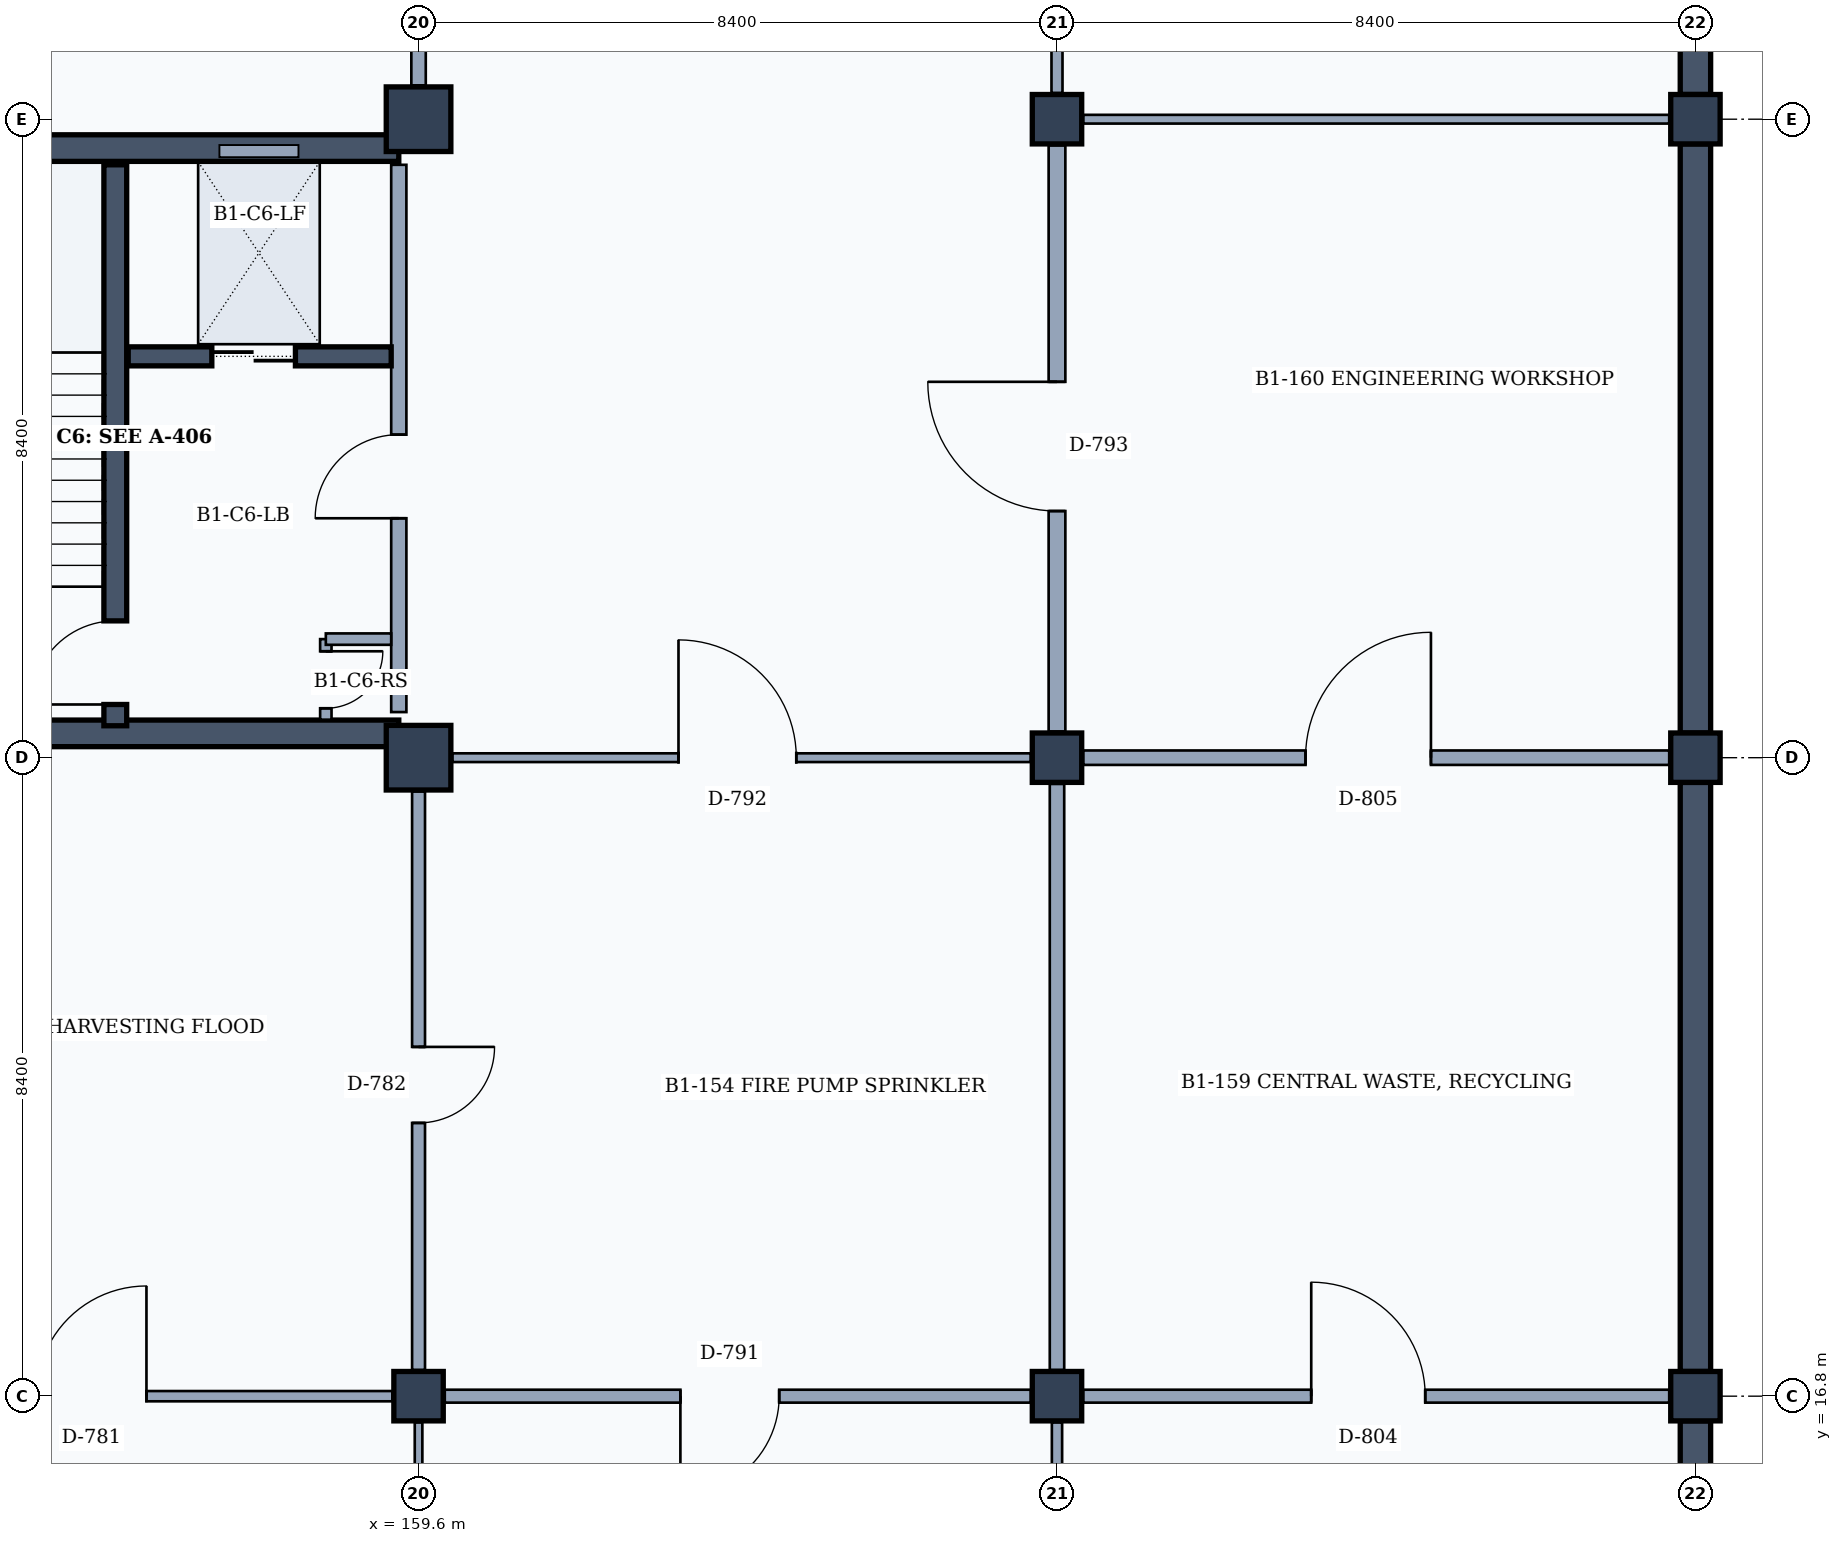
"""IFC4 building model, lengths in metres.
Left out: names, types, materials, properties, quantities, classifications, styles, units other than length and angle.
Written with IfcOpenShell. Run it as: python <this file> out.ifc"""

import sys

from ifc_helpers import new_model, si_unit, direction, frame, frame_2d, origin, origin_2d, place, context, subcontext, project, spatial, rectangle, extrude, element, fill, save


model = new_model("IFC4")
c1 = context("Model", 3, precision=1e-05, world=origin(), true_north=direction((0.0, 1.0)))
c2 = subcontext(c1, "Body", "Model", "MODEL_VIEW")
j1 = project(units=[si_unit("LENGTHUNIT", "METRE"), si_unit("PLANEANGLEUNIT", "RADIAN")], contexts=[c1])
p1 = place(None, origin())
s1 = spatial("IfcSite", under=j1, at=p1, CompositionType="ELEMENT")
p2 = place(p1, origin())
s2 = spatial("IfcBuilding", under=s1, at=p2, CompositionType="ELEMENT")
p3 = place(p2, frame((0.0, 0.0, -4.2)))
s3 = spatial("IfcBuildingStorey", under=s2, at=p3, CompositionType="ELEMENT", Elevation=-4.2)
p4 = place(p3, frame((159.6, 16.8, 0.0), z_axis=(0.0, 0.0, 1.0), x_axis=(1.0, 0.0, 0.0)))
e1 = element("IfcColumn", 1, at=p4, inside=s3, PredefinedType="COLUMN", context=c2, shape_type="SweptSolid", body=[
    extrude(rectangle(XDim=0.65, YDim=0.65, at=origin_2d()), origin(), (0.0, 0.0, 1.0), 4.2),
])
for number, where, z_axis, x_axis in (
    (2, (159.6, 25.2, 0.0), (0.0, 0.0, 1.0), (1.0, 0.0, 0.0)),
    (3, (159.6, 33.6, 0.0), (0.0, 0.0, 1.0), (1.0, 0.0, 0.0)),
):
    element("IfcColumn", number, at=place(p3, frame(where, z_axis=z_axis, x_axis=x_axis)), inside=s3, PredefinedType="COLUMN", context=c2, shape_type="SweptSolid", body=[
        extrude(rectangle(XDim=0.85, YDim=0.85, at=origin_2d()), origin(), (0.0, 0.0, 1.0), 4.2),
    ])
for number, where, z_axis, x_axis in (
    (4, (168.0, 16.8, 0.0), (0.0, 0.0, 1.0), (1.0, 0.0, 0.0)),
    (5, (168.0, 25.2, 0.0), (0.0, 0.0, 1.0), (1.0, 0.0, 0.0)),
    (6, (168.0, 33.6, 0.0), (0.0, 0.0, 1.0), (1.0, 0.0, 0.0)),
    (7, (176.4, 16.8, 0.0), (0.0, 0.0, 1.0), (1.0, 0.0, 0.0)),
    (8, (176.4, 25.2, 0.0), (0.0, 0.0, 1.0), (1.0, 0.0, 0.0)),
    (9, (176.4, 33.6, 0.0), (0.0, 0.0, 1.0), (1.0, 0.0, 0.0)),
):
    element("IfcColumn", number, at=place(p3, frame(where, z_axis=z_axis, x_axis=x_axis)), inside=s3, PredefinedType="COLUMN", context=c2, shape_type="SweptSolid", body=[
        extrude(rectangle(XDim=0.65, YDim=0.65, at=origin_2d()), origin(), (0.0, 0.0, 1.0), 4.2),
    ])
for number, where, z_axis, x_axis in (
    (10, (176.4, 16.475, 0.0), (0.0, 0.0, 1.0), (0.0, -1.0, 0.0)),
    (11, (176.4, 24.875, 0.0), (0.0, 0.0, 1.0), (0.0, -1.0, 0.0)),
    (12, (176.4, 33.275, 0.0), (0.0, 0.0, 1.0), (0.0, -1.0, 0.0)),
    (13, (176.4, 41.675, 0.0), (0.0, 0.0, 1.0), (0.0, -1.0, 0.0)),
):
    element("IfcWall", number, at=place(p3, frame(where, z_axis=z_axis, x_axis=x_axis)), inside=s3, PredefinedType="STANDARD", context=c2, shape_type="SweptSolid", body=[
        extrude(rectangle(XDim=7.75, YDim=0.4, at=frame_2d((3.875, 0.0))), origin(), (0.0, 0.0, 1.0), 3.88),
    ])
p5 = place(p3, frame((151.44, 33.22, 0.0), z_axis=(0.0, 0.0, 1.0), x_axis=(1.0, 0.0, 0.0)))
e14 = element("IfcWall", 14, at=p5, inside=s3, PredefinedType="SHEAR", context=c2, shape_type="SweptSolid", body=[
    extrude(rectangle(XDim=7.9, YDim=0.35, at=frame_2d((3.95, 0.0))), origin(), (0.0, 0.0, 1.0), 3.9),
])
p6 = place(p3, frame((159.34, 33.0, 0.0), z_axis=(0.0, 0.0, 1.0), x_axis=(0.0, -1.0, 0.0)))
e15 = element("IfcWall", 15, at=p6, inside=s3, PredefinedType="PARTITIONING", context=c2, shape_type="SweptSolid", body=[
    extrude(rectangle(XDim=7.2, YDim=0.2, at=frame_2d((3.6, 0.0))), origin(), (0.0, 0.0, 1.0), 3.1),
])
p7 = place(p6, frame((3.55, 0.0, 0.0)))
e16 = element("IfcOpeningElement", 16, at=p7, cuts=e15, PredefinedType="OPENING", context=c2, shape_type="SweptSolid", body=[
    extrude(rectangle(XDim=1.1, YDim=2.15, at=frame_2d((0.55, 1.075))), frame((0.0, 0.11, 0.0), z_axis=(0.0, -1.0, 0.0), x_axis=(1.0, 0.0, 0.0)), (0.0, 0.0, 1.0), 0.22),
])
p8 = place(p3, frame((159.34, 25.52, 0.0), z_axis=(0.0, 0.0, 1.0), x_axis=(-1.0, 0.0, 0.0)))
e17 = element("IfcWall", 17, at=p8, inside=s3, PredefinedType="SHEAR", context=c2, shape_type="SweptSolid", body=[
    extrude(rectangle(XDim=7.9, YDim=0.35, at=frame_2d((3.95, 0.0))), origin(), (0.0, 0.0, 1.0), 3.9),
])
p9 = place(p3, frame((155.61, 25.62, 0.0), z_axis=(0.0, 0.0, 1.0), x_axis=(0.0, 1.0, 0.0)))
e18 = element("IfcWall", 18, at=p9, inside=s3, PredefinedType="SHEAR", context=c2, shape_type="SweptSolid", body=[
    extrude(rectangle(XDim=7.38, YDim=0.3, at=frame_2d((3.69, 0.0))), origin(), (0.0, 0.0, 1.0), 3.9),
])
p10 = place(p9, frame((0.28, 0.0, 0.0)))
e19 = element("IfcOpeningElement", 19, at=p10, cuts=e18, PredefinedType="OPENING", context=c2, shape_type="SweptSolid", body=[
    extrude(rectangle(XDim=1.1, YDim=2.15, at=frame_2d((0.55, 1.075))), frame((0.0, 0.16, 0.0), z_axis=(0.0, -1.0, 0.0), x_axis=(1.0, 0.0, 0.0)), (0.0, 0.0, 1.0), 0.32),
])
p11 = place(p3, frame((158.38, 26.76, 0.0), z_axis=(0.0, 0.0, 1.0), x_axis=(0.0, -1.0, 0.0)))
e20 = element("IfcWall", 20, at=p11, inside=s3, PredefinedType="PARTITIONING", context=c2, shape_type="SweptSolid", body=[
    extrude(rectangle(XDim=1.06, YDim=0.15, at=frame_2d((0.53, 0.0))), origin(), (0.0, 0.0, 1.0), 3.32),
])
p12 = place(p11, frame((0.16, 0.0, 0.0)))
e21 = element("IfcOpeningElement", 21, at=p12, cuts=e20, PredefinedType="OPENING", context=c2, shape_type="SweptSolid", body=[
    extrude(rectangle(XDim=0.75, YDim=2.05, at=frame_2d((0.375, 1.025))), frame((0.0, 0.085, 0.0), z_axis=(0.0, -1.0, 0.0), x_axis=(1.0, 0.0, 0.0)), (0.0, 0.0, 1.0), 0.17),
])
p13 = place(p3, frame((158.38, 26.76, 0.0), z_axis=(0.0, 0.0, 1.0), x_axis=(1.0, 0.0, 0.0)))
e22 = element("IfcWall", 22, at=p13, inside=s3, PredefinedType="PARTITIONING", context=c2, shape_type="SweptSolid", body=[
    extrude(rectangle(XDim=0.86, YDim=0.15, at=frame_2d((0.43, 0.0))), origin(), (0.0, 0.0, 1.0), 3.32),
])
p14 = place(p3, frame((155.78, 30.48, 0.0), z_axis=(0.0, 0.0, 1.0), x_axis=(1.0, 0.0, 0.0)))
e23 = element("IfcWall", 23, at=p14, inside=s3, PredefinedType="SHEAR", context=c2, shape_type="SweptSolid", body=[
    extrude(rectangle(XDim=3.46, YDim=0.25, at=frame_2d((1.73, 0.0))), origin(), (0.0, 0.0, 1.0), 3.9),
])
p15 = place(p14, frame((1.1, 0.0, 0.0)))
e24 = element("IfcOpeningElement", 24, at=p15, cuts=e23, PredefinedType="OPENING", context=c2, shape_type="SweptSolid", body=[
    extrude(rectangle(XDim=1.1, YDim=2.15, at=frame_2d((0.55, 1.075))), frame((0.0, 0.135, 0.0), z_axis=(0.0, -1.0, 0.0), x_axis=(1.0, 0.0, 0.0)), (0.0, 0.0, 1.0), 0.27),
])
p16 = place(p3, frame((159.6, 8.745, 0.0), z_axis=(0.0, 0.0, 1.0), x_axis=(0.0, 1.0, 0.0)))
e25 = element("IfcWall", 25, at=p16, inside=s3, PredefinedType="MOVABLE", context=c2, shape_type="SweptSolid", body=[
    extrude(rectangle(XDim=7.71, YDim=0.1, at=frame_2d((3.855, 0.0))), origin(), (0.0, 0.0, 1.0), 3.1),
])
p17 = place(p3, frame((151.545, 16.8, 0.0), z_axis=(0.0, 0.0, 1.0), x_axis=(1.0, 0.0, 0.0)))
e26 = element("IfcWall", 26, at=p17, inside=s3, PredefinedType="PARTITIONING", context=c2, shape_type="SweptSolid", body=[
    extrude(rectangle(XDim=7.71, YDim=0.135, at=frame_2d((3.855, 0.0))), origin(), (0.0, 0.0, 1.0), 3.05),
])
p18 = place(p17, frame((3.025, 0.0, 0.0)))
e27 = element("IfcOpeningElement", 27, at=p18, cuts=e26, PredefinedType="OPENING", context=c2, shape_type="SweptSolid", body=[
    extrude(rectangle(XDim=1.45, YDim=2.35, at=frame_2d((0.725, 1.175))), frame((0.0, 0.077, 0.0), z_axis=(0.0, -1.0, 0.0), x_axis=(1.0, 0.0, 0.0)), (0.0, 0.0, 1.0), 0.155),
])
p19 = place(p3, frame((159.6, 17.145, 0.0), z_axis=(0.0, 0.0, 1.0), x_axis=(0.0, 1.0, 0.0)))
e28 = element("IfcWall", 28, at=p19, inside=s3, PredefinedType="PARTITIONING", context=c2, shape_type="SweptSolid", body=[
    extrude(rectangle(XDim=7.61, YDim=0.17, at=frame_2d((3.805, 0.0))), origin(), (0.0, 0.0, 1.0), 3.1),
])
p20 = place(p19, frame((3.25, 0.0, 0.0)))
e29 = element("IfcOpeningElement", 29, at=p20, cuts=e28, PredefinedType="OPENING", context=c2, shape_type="SweptSolid", body=[
    extrude(rectangle(XDim=1.0, YDim=2.15, at=frame_2d((0.5, 1.075))), frame((0.0, 0.095, 0.0), z_axis=(0.0, -1.0, 0.0), x_axis=(1.0, 0.0, 0.0)), (0.0, 0.0, 1.0), 0.19),
])
p21 = place(p3, frame((159.6, 34.045, 0.0), z_axis=(0.0, 0.0, 1.0), x_axis=(0.0, 1.0, 0.0)))
e30 = element("IfcWall", 30, at=p21, inside=s3, PredefinedType="PARTITIONING", context=c2, shape_type="SweptSolid", body=[
    extrude(rectangle(XDim=7.61, YDim=0.19, at=frame_2d((3.805, 0.0))), origin(), (0.0, 0.0, 1.0), 3.1),
])
p22 = place(p3, frame((168.0, 8.745, 0.0), z_axis=(0.0, 0.0, 1.0), x_axis=(0.0, 1.0, 0.0)))
e31 = element("IfcWall", 31, at=p22, inside=s3, PredefinedType="PARTITIONING", context=c2, shape_type="SweptSolid", body=[
    extrude(rectangle(XDim=7.71, YDim=0.135, at=frame_2d((3.855, 0.0))), origin(), (0.0, 0.0, 1.0), 3.1),
])
p23 = place(p3, frame((159.945, 16.8, 0.0), z_axis=(0.0, 0.0, 1.0), x_axis=(1.0, 0.0, 0.0)))
e32 = element("IfcWall", 32, at=p23, inside=s3, PredefinedType="PARTITIONING", context=c2, shape_type="SweptSolid", body=[
    extrude(rectangle(XDim=7.71, YDim=0.17, at=frame_2d((3.855, 0.0))), origin(), (0.0, 0.0, 1.0), 3.05),
])
p24 = place(p23, frame((3.1, 0.0, 0.0)))
e33 = element("IfcOpeningElement", 33, at=p24, cuts=e32, PredefinedType="OPENING", context=c2, shape_type="SweptSolid", body=[
    extrude(rectangle(XDim=1.3, YDim=2.2, at=frame_2d((0.65, 1.1))), frame((0.0, 0.095, 0.0), z_axis=(0.0, -1.0, 0.0), x_axis=(1.0, 0.0, 0.0)), (0.0, 0.0, 1.0), 0.19),
])
p25 = place(p3, frame((168.0, 17.145, 0.0), z_axis=(0.0, 0.0, 1.0), x_axis=(0.0, 1.0, 0.0)))
e34 = element("IfcWall", 34, at=p25, inside=s3, PredefinedType="PARTITIONING", context=c2, shape_type="SweptSolid", body=[
    extrude(rectangle(XDim=7.71, YDim=0.19, at=frame_2d((3.855, 0.0))), origin(), (0.0, 0.0, 1.0), 3.1),
])
p26 = place(p3, frame((160.045, 25.2, 0.0), z_axis=(0.0, 0.0, 1.0), x_axis=(1.0, 0.0, 0.0)))
e35 = element("IfcWall", 35, at=p26, inside=s3, PredefinedType="PARTITIONING", context=c2, shape_type="SweptSolid", body=[
    extrude(rectangle(XDim=7.61, YDim=0.115, at=frame_2d((3.805, 0.0))), origin(), (0.0, 0.0, 1.0), 3.05),
])
p27 = place(p26, frame((2.975, 0.0, 0.0)))
e36 = element("IfcOpeningElement", 36, at=p27, cuts=e35, PredefinedType="OPENING", context=c2, shape_type="SweptSolid", body=[
    extrude(rectangle(XDim=1.55, YDim=2.35, at=frame_2d((0.775, 1.175))), frame((0.0, 0.067, 0.0), z_axis=(0.0, -1.0, 0.0), x_axis=(1.0, 0.0, 0.0)), (0.0, 0.0, 1.0), 0.135),
])
p28 = place(p3, frame((168.0, 25.545, 0.0), z_axis=(0.0, 0.0, 1.0), x_axis=(0.0, 1.0, 0.0)))
e37 = element("IfcWall", 37, at=p28, inside=s3, PredefinedType="PARTITIONING", context=c2, shape_type="SweptSolid", body=[
    extrude(rectangle(XDim=7.71, YDim=0.22, at=frame_2d((3.855, 0.0))), origin(), (0.0, 0.0, 1.0), 3.1),
])
p29 = place(p28, frame((2.9, 0.0, 0.0)))
e38 = element("IfcOpeningElement", 38, at=p29, cuts=e37, PredefinedType="OPENING", context=c2, shape_type="SweptSolid", body=[
    extrude(rectangle(XDim=1.7, YDim=2.3, at=frame_2d((0.85, 1.15))), frame((0.0, 0.12, 0.0), z_axis=(0.0, -1.0, 0.0), x_axis=(1.0, 0.0, 0.0)), (0.0, 0.0, 1.0), 0.24),
])
p30 = place(p3, frame((168.0, 33.945, 0.0), z_axis=(0.0, 0.0, 1.0), x_axis=(0.0, 1.0, 0.0)))
e39 = element("IfcWall", 39, at=p30, inside=s3, PredefinedType="PARTITIONING", context=c2, shape_type="SweptSolid", body=[
    extrude(rectangle(XDim=7.71, YDim=0.145, at=frame_2d((3.855, 0.0))), origin(), (0.0, 0.0, 1.0), 3.1),
])
p31 = place(p30, frame((2.8, 0.0, 0.0)))
e40 = element("IfcOpeningElement", 40, at=p31, cuts=e39, PredefinedType="OPENING", context=c2, shape_type="SweptSolid", body=[
    extrude(rectangle(XDim=1.9, YDim=2.4, at=frame_2d((0.95, 1.2))), frame((0.0, 0.083, 0.0), z_axis=(0.0, -1.0, 0.0), x_axis=(1.0, 0.0, 0.0)), (0.0, 0.0, 1.0), 0.165),
])
p32 = place(p3, frame((168.345, 16.8, 0.0), z_axis=(0.0, 0.0, 1.0), x_axis=(1.0, 0.0, 0.0)))
e41 = element("IfcWall", 41, at=p32, inside=s3, PredefinedType="PARTITIONING", context=c2, shape_type="SweptSolid", body=[
    extrude(rectangle(XDim=7.71, YDim=0.17, at=frame_2d((3.855, 0.0))), origin(), (0.0, 0.0, 1.0), 3.05),
])
p33 = place(p32, frame((3.0, 0.0, 0.0)))
e42 = element("IfcOpeningElement", 42, at=p33, cuts=e41, PredefinedType="OPENING", context=c2, shape_type="SweptSolid", body=[
    extrude(rectangle(XDim=1.5, YDim=2.3, at=frame_2d((0.75, 1.15))), frame((0.0, 0.095, 0.0), z_axis=(0.0, -1.0, 0.0), x_axis=(1.0, 0.0, 0.0)), (0.0, 0.0, 1.0), 0.19),
])
p34 = place(p3, frame((168.345, 25.2, 0.0), z_axis=(0.0, 0.0, 1.0), x_axis=(1.0, 0.0, 0.0)))
e43 = element("IfcWall", 43, at=p34, inside=s3, PredefinedType="PARTITIONING", context=c2, shape_type="SweptSolid", body=[
    extrude(rectangle(XDim=7.71, YDim=0.19, at=frame_2d((3.855, 0.0))), origin(), (0.0, 0.0, 1.0), 3.05),
])
p35 = place(p34, frame((2.925, 0.0, 0.0)))
e44 = element("IfcOpeningElement", 44, at=p35, cuts=e43, PredefinedType="OPENING", context=c2, shape_type="SweptSolid", body=[
    extrude(rectangle(XDim=1.65, YDim=2.25, at=frame_2d((0.825, 1.125))), frame((0.0, 0.105, 0.0), z_axis=(0.0, -1.0, 0.0), x_axis=(1.0, 0.0, 0.0)), (0.0, 0.0, 1.0), 0.21),
])
p36 = place(p3, frame((168.345, 33.6, 0.0), z_axis=(0.0, 0.0, 1.0), x_axis=(1.0, 0.0, 0.0)))
e45 = element("IfcWall", 45, at=p36, inside=s3, PredefinedType="PARTITIONING", context=c2, shape_type="SweptSolid", body=[
    extrude(rectangle(XDim=7.71, YDim=0.115, at=frame_2d((3.855, 0.0))), origin(), (0.0, 0.0, 1.0), 3.05),
])
p37 = place(p7, frame((1.1, 0.0, 0.0), z_axis=(0.0, 0.0, 1.0), x_axis=(-1.0, 0.0, 0.0)))
e46 = element("IfcDoor", 46, at=p37, inside=s3, OperationType="SINGLE_SWING_LEFT", PredefinedType="DOOR", context=c2, shape_type="SweptSolid", body=[
    extrude(rectangle(XDim=1.1, YDim=2.15, at=frame_2d((0.55, 1.075))), frame((0.0, 0.025, 0.0), z_axis=(0.0, -1.0, 0.0), x_axis=(1.0, 0.0, 0.0)), (0.0, 0.0, 1.0), 0.05),
])
fill(e16, e46)
p38 = place(p10, origin())
e47 = element("IfcDoor", 47, at=p38, inside=s3, OperationType="SINGLE_SWING_LEFT", PredefinedType="DOOR", context=c2, shape_type="SweptSolid", body=[
    extrude(rectangle(XDim=1.1, YDim=2.15, at=frame_2d((0.55, 1.075))), frame((0.0, 0.025, 0.0), z_axis=(0.0, -1.0, 0.0), x_axis=(1.0, 0.0, 0.0)), (0.0, 0.0, 1.0), 0.05),
])
fill(e19, e47)
p39 = place(p12, origin())
e48 = element("IfcDoor", 48, at=p39, inside=s3, OperationType="SINGLE_SWING_LEFT", PredefinedType="TRAPDOOR", context=c2, shape_type="SweptSolid", body=[
    extrude(rectangle(XDim=0.75, YDim=2.05, at=frame_2d((0.375, 1.025))), frame((0.0, 0.025, 0.0), z_axis=(0.0, -1.0, 0.0), x_axis=(1.0, 0.0, 0.0)), (0.0, 0.0, 1.0), 0.05),
])
fill(e21, e48)
p40 = place(p15, origin())
e49 = element("IfcDoor", 49, at=p40, inside=s3, OperationType="DOUBLE_DOOR_SLIDING", PredefinedType="DOOR", context=c2, shape_type="SweptSolid", body=[
    extrude(rectangle(XDim=1.1, YDim=2.15, at=frame_2d((0.55, 1.075))), frame((0.0, 0.025, 0.0), z_axis=(0.0, -1.0, 0.0), x_axis=(1.0, 0.0, 0.0)), (0.0, 0.0, 1.0), 0.05),
])
fill(e24, e49)
p41 = place(p18, origin())
e50 = element("IfcDoor", 50, at=p41, inside=s3, OperationType="SINGLE_SWING_RIGHT", PredefinedType="DOOR", context=c2, shape_type="SweptSolid", body=[
    extrude(rectangle(XDim=1.45, YDim=2.35, at=frame_2d((0.725, 1.175))), frame((0.0, 0.025, 0.0), z_axis=(0.0, -1.0, 0.0), x_axis=(1.0, 0.0, 0.0)), (0.0, 0.0, 1.0), 0.05),
])
fill(e27, e50)
p42 = place(p20, frame((1.0, 0.0, 0.0), z_axis=(0.0, 0.0, 1.0), x_axis=(-1.0, 0.0, 0.0)))
e51 = element("IfcDoor", 51, at=p42, inside=s3, OperationType="SINGLE_SWING_LEFT", PredefinedType="DOOR", context=c2, shape_type="SweptSolid", body=[
    extrude(rectangle(XDim=1.0, YDim=2.15, at=frame_2d((0.5, 1.075))), frame((0.0, 0.025, 0.0), z_axis=(0.0, -1.0, 0.0), x_axis=(1.0, 0.0, 0.0)), (0.0, 0.0, 1.0), 0.05),
])
fill(e29, e51)
p43 = place(p24, frame((1.3, 0.0, 0.0), z_axis=(0.0, 0.0, 1.0), x_axis=(-1.0, 0.0, 0.0)))
e52 = element("IfcDoor", 52, at=p43, inside=s3, OperationType="SINGLE_SWING_RIGHT", PredefinedType="DOOR", context=c2, shape_type="SweptSolid", body=[
    extrude(rectangle(XDim=1.3, YDim=2.2, at=frame_2d((0.65, 1.1))), frame((0.0, 0.025, 0.0), z_axis=(0.0, -1.0, 0.0), x_axis=(1.0, 0.0, 0.0)), (0.0, 0.0, 1.0), 0.05),
])
fill(e33, e52)
p44 = place(p27, origin())
e53 = element("IfcDoor", 53, at=p44, inside=s3, OperationType="SINGLE_SWING_LEFT", PredefinedType="DOOR", context=c2, shape_type="SweptSolid", body=[
    extrude(rectangle(XDim=1.55, YDim=2.35, at=frame_2d((0.775, 1.175))), frame((0.0, 0.025, 0.0), z_axis=(0.0, -1.0, 0.0), x_axis=(1.0, 0.0, 0.0)), (0.0, 0.0, 1.0), 0.05),
])
fill(e36, e53)
p45 = place(p29, origin())
e54 = element("IfcDoor", 54, at=p45, inside=s3, OperationType="SINGLE_SWING_RIGHT", PredefinedType="DOOR", context=c2, shape_type="SweptSolid", body=[
    extrude(rectangle(XDim=1.7, YDim=2.3, at=frame_2d((0.85, 1.15))), frame((0.0, 0.025, 0.0), z_axis=(0.0, -1.0, 0.0), x_axis=(1.0, 0.0, 0.0)), (0.0, 0.0, 1.0), 0.05),
])
fill(e38, e54)
p46 = place(p33, origin())
e55 = element("IfcDoor", 55, at=p46, inside=s3, OperationType="SINGLE_SWING_LEFT", PredefinedType="DOOR", context=c2, shape_type="SweptSolid", body=[
    extrude(rectangle(XDim=1.5, YDim=2.3, at=frame_2d((0.75, 1.15))), frame((0.0, 0.025, 0.0), z_axis=(0.0, -1.0, 0.0), x_axis=(1.0, 0.0, 0.0)), (0.0, 0.0, 1.0), 0.05),
])
fill(e42, e55)
p47 = place(p35, origin())
e56 = element("IfcDoor", 56, at=p47, inside=s3, OperationType="SINGLE_SWING_RIGHT", PredefinedType="DOOR", context=c2, shape_type="SweptSolid", body=[
    extrude(rectangle(XDim=1.65, YDim=2.25, at=frame_2d((0.825, 1.125))), frame((0.0, 0.025, 0.0), z_axis=(0.0, -1.0, 0.0), x_axis=(1.0, 0.0, 0.0)), (0.0, 0.0, 1.0), 0.05),
])
fill(e44, e56)
save(model, sys.argv[1])
